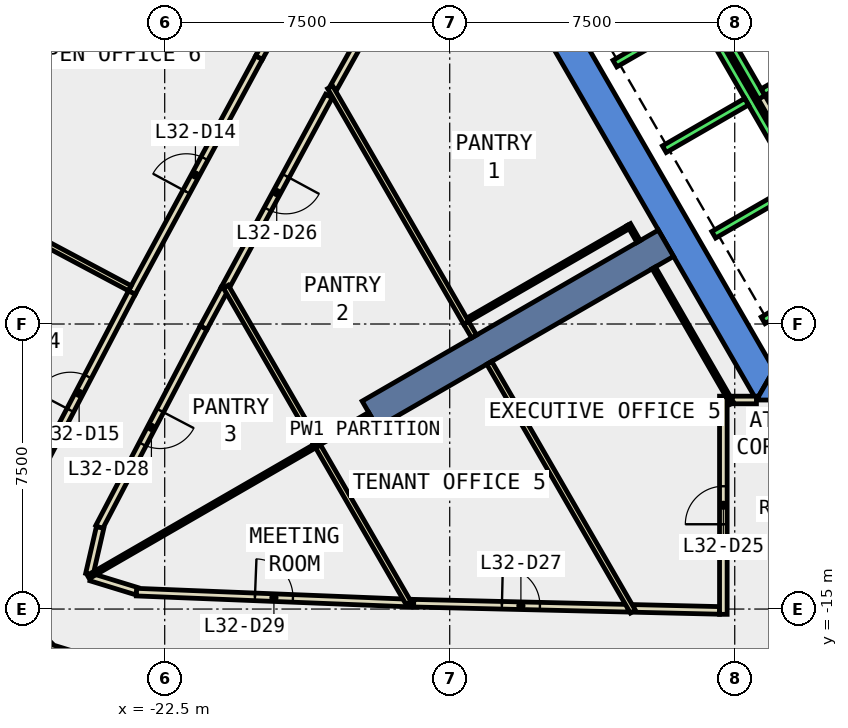
"""IFC4 building model, lengths in metres.
Left out: names, types, materials, properties, quantities, classifications, styles, units other than length and angle.
Written with IfcOpenShell. Run it as: python <this file> out.ifc"""

import sys

from ifc_helpers import new_model, si_unit, direction, frame, frame_2d, origin, place, context, subcontext, project, spatial, polyline, rectangle, outline, extrude, element, fill, save


model = new_model("IFC4")
c1 = context("Model", 3, precision=1e-05, world=origin(), true_north=direction((0.0, 1.0)))
c2 = subcontext(c1, "Body", "Model", "MODEL_VIEW")
j1 = project(units=[si_unit("LENGTHUNIT", "METRE"), si_unit("PLANEANGLEUNIT", "RADIAN")], contexts=[c1])
p1 = place(None, origin())
s1 = spatial("IfcSite", under=j1, at=p1, CompositionType="ELEMENT")
p2 = place(p1, origin())
s2 = spatial("IfcBuilding", under=s1, at=p2, CompositionType="ELEMENT")
p3 = place(p2, frame((0.0, 0.0, 146.6)))
s3 = spatial("IfcBuildingStorey", under=s2, at=p3, CompositionType="ELEMENT", Elevation=146.6)
p4 = place(p3, frame((0.0, 0.0, -0.4)))
e1 = element("IfcWall", 1, at=p4, inside=s3, PredefinedType="SHEAR", context=c2, shape_type="SweptSolid", body=[
    extrude(outline(polyline([(-13.856, 2.5), (-6.928, -9.5), (-6.466, -8.7), (-12.933, 2.5), (-13.856, 2.5)])), origin(), (0.0, 0.0, 1.0), 4.2),
])
p5 = place(p3, frame((0.0, 0.0, -0.4)))
e2 = element("IfcWall", 2, at=p5, inside=s3, PredefinedType="SHEAR", context=c2, shape_type="SweptSolid", body=[
    extrude(outline(polyline([(3.75, -9.5), (3.75, -8.7), (-6.466, -8.7), (-6.928, -9.5), (3.75, -9.5)])), origin(), (0.0, 0.0, 1.0), 4.2),
])
p6 = place(p3, frame((-9.31, -5.375, -0.4), z_axis=(0.0, 0.0, 1.0), x_axis=(-0.866017533419, -0.500013631625, 0.0)))
e3 = element("IfcWall", 3, at=p6, inside=s3, PredefinedType="SHEAR", context=c2, shape_type="SweptSolid", body=[
    extrude(rectangle(XDim=9.0, YDim=0.8, at=frame_2d((4.5, 0.0))), origin(), (0.0, 0.0, 1.0), 4.2),
])
p7 = place(p3, frame((-14.955, 4.264, 0.0), z_axis=(0.0, 0.0, 1.0), x_axis=(-0.4879770011, -0.872856486713, 0.0)))
e4 = element("IfcWall", 4, at=p7, inside=s3, PredefinedType="PARTITIONING", context=c2, shape_type="SweptSolid", body=[
    extrude(rectangle(XDim=6.363, YDim=0.2, at=frame_2d((3.182, 0.0))), origin(), (0.0, 0.0, 1.0), 3.8),
])
p8 = place(p7, frame((2.681, 0.0, 0.0)))
e5 = element("IfcOpeningElement", 5, at=p8, cuts=e4, PredefinedType="OPENING", context=c2, shape_type="SweptSolid", body=[
    extrude(rectangle(XDim=1.0, YDim=2.1, at=frame_2d((0.5, 1.05))), frame((0.0, 0.11, 0.0), z_axis=(0.0, -1.0, 0.0), x_axis=(1.0, 0.0, 0.0)), (0.0, 0.0, 1.0), 0.22),
])
p9 = place(p3, frame((-10.155, -14.983, 0.0), z_axis=(0.0, 0.0, 1.0), x_axis=(0.999724165956, -0.023485995887, 0.0)))
e6 = element("IfcWall", 6, at=p9, inside=s3, PredefinedType="PARTITIONING", context=c2, shape_type="SweptSolid", body=[
    extrude(rectangle(XDim=2.256, YDim=0.2, at=frame_2d((1.128, 0.0))), origin(), (0.0, 0.0, 1.0), 3.8),
])
p10 = place(p3, frame((-18.178, -1.501, 0.0), z_axis=(0.0, 0.0, 1.0), x_axis=(-0.475923642768, -0.879486603795, 0.0)))
e7 = element("IfcWall", 7, at=p10, inside=s3, PredefinedType="PARTITIONING", context=c2, shape_type="SweptSolid", body=[
    extrude(rectangle(XDim=5.776, YDim=0.2, at=frame_2d((2.888, 0.0))), origin(), (0.0, 0.0, 1.0), 3.8),
])
p11 = place(p10, frame((2.388, 0.0, 0.0)))
e8 = element("IfcOpeningElement", 8, at=p11, cuts=e7, PredefinedType="OPENING", context=c2, shape_type="SweptSolid", body=[
    extrude(rectangle(XDim=1.0, YDim=2.1, at=frame_2d((0.5, 1.05))), frame((0.0, 0.11, 0.0), z_axis=(0.0, -1.0, 0.0), x_axis=(1.0, 0.0, 0.0)), (0.0, 0.0, 1.0), 0.22),
])
p12 = place(p3, frame((-15.948, -14.846, 0.0), z_axis=(0.0, 0.0, 1.0), x_axis=(0.999722136341, -0.023572231734, 0.0)))
e9 = element("IfcWall", 9, at=p12, inside=s3, PredefinedType="PARTITIONING", context=c2, shape_type="SweptSolid", body=[
    extrude(rectangle(XDim=5.645, YDim=0.2, at=frame_2d((2.822, 0.0))), origin(), (0.0, 0.0, 1.0), 3.8),
])
p13 = place(p12, frame((2.322, 0.0, 0.0)))
e10 = element("IfcOpeningElement", 10, at=p13, cuts=e9, PredefinedType="OPENING", context=c2, shape_type="SweptSolid", body=[
    extrude(rectangle(XDim=1.0, YDim=2.1, at=frame_2d((0.5, 1.05))), frame((0.0, 0.11, 0.0), z_axis=(0.0, -1.0, 0.0), x_axis=(1.0, 0.0, 0.0)), (0.0, 0.0, 1.0), 0.22),
])
p14 = place(p3, frame((-21.475, -7.594, 0.0), z_axis=(0.0, 0.0, 1.0), x_axis=(-0.463809970306, -0.885934710599, 0.0)))
e11 = element("IfcWall", 11, at=p14, inside=s3, PredefinedType="PARTITIONING", context=c2, shape_type="SweptSolid", body=[
    extrude(rectangle(XDim=5.927, YDim=0.2, at=frame_2d((2.963, 0.0))), origin(), (0.0, 0.0, 1.0), 3.8),
])
p15 = place(p14, frame((2.464, 0.0, 0.0)))
e12 = element("IfcOpeningElement", 12, at=p15, cuts=e11, PredefinedType="OPENING", context=c2, shape_type="SweptSolid", body=[
    extrude(rectangle(XDim=1.0, YDim=2.1, at=frame_2d((0.5, 1.05))), frame((0.0, 0.11, 0.0), z_axis=(0.0, -1.0, 0.0), x_axis=(1.0, 0.0, 0.0)), (0.0, 0.0, 1.0), 0.22),
])
p16 = place(p3, frame((-24.2, -12.854, 0.0), z_axis=(0.0, 0.0, 1.0), x_axis=(-0.223967203961, -0.974596681479, 0.0)))
e13 = element("IfcWall", 13, at=p16, inside=s3, PredefinedType="PARTITIONING", context=c2, shape_type="SweptSolid", body=[
    extrude(rectangle(XDim=1.259, YDim=0.2, at=frame_2d((0.629, 0.0))), origin(), (0.0, 0.0, 1.0), 3.8),
])
p17 = place(p3, frame((-20.927, -6.581, 0.0), z_axis=(0.0, 0.0, 1.0), x_axis=(-0.475893856394, -0.879502721682, 0.0)))
e14 = element("IfcWall", 14, at=p17, inside=s3, PredefinedType="PARTITIONING", context=c2, shape_type="SweptSolid", body=[
    extrude(rectangle(XDim=1.152, YDim=0.2, at=frame_2d((0.576, 0.0))), origin(), (0.0, 0.0, 1.0), 3.8),
])
p18 = place(p3, frame((-24.435, -14.162, 0.0), z_axis=(0.0, 0.0, 1.0), x_axis=(0.956086269468, -0.293085389152, 0.0)))
e15 = element("IfcWall", 15, at=p18, inside=s3, PredefinedType="PARTITIONING", context=c2, shape_type="SweptSolid", body=[
    extrude(rectangle(XDim=1.252, YDim=0.2, at=frame_2d((0.626, 0.0))), origin(), (0.0, 0.0, 1.0), 3.8),
])
p19 = place(p3, frame((-23.242, -14.555, 0.0), z_axis=(0.0, 0.0, 1.0), x_axis=(0.999202143743, -0.039938401802, 0.0)))
e16 = element("IfcWall", 16, at=p19, inside=s3, PredefinedType="PARTITIONING", context=c2, shape_type="SweptSolid", body=[
    extrude(rectangle(XDim=7.238, YDim=0.2, at=frame_2d((3.619, 0.0))), origin(), (0.0, 0.0, 1.0), 3.8),
])
p20 = place(p19, frame((3.119, 0.0, 0.0)))
e17 = element("IfcOpeningElement", 17, at=p20, cuts=e16, PredefinedType="OPENING", context=c2, shape_type="SweptSolid", body=[
    extrude(rectangle(XDim=1.0, YDim=2.1, at=frame_2d((0.5, 1.05))), frame((0.0, 0.11, 0.0), z_axis=(0.0, -1.0, 0.0), x_axis=(1.0, 0.0, 0.0)), (0.0, 0.0, 1.0), 0.22),
])
p21 = place(p3, frame((-23.365, -6.673, 0.0), z_axis=(0.0, 0.0, 1.0), x_axis=(0.47597665142, 0.879457916732, 0.0)))
e18 = element("IfcWall", 18, at=p21, inside=s3, PredefinedType="PARTITIONING", context=c2, shape_type="SweptSolid", body=[
    extrude(rectangle(XDim=7.032, YDim=0.2, at=frame_2d((3.516, 0.0))), origin(), (0.0, 0.0, 1.0), 3.8),
])
p22 = place(p21, frame((3.016, 0.0, 0.0)))
e19 = element("IfcOpeningElement", 19, at=p22, cuts=e18, PredefinedType="OPENING", context=c2, shape_type="SweptSolid", body=[
    extrude(rectangle(XDim=1.0, YDim=2.1, at=frame_2d((0.5, 1.05))), frame((0.0, 0.11, 0.0), z_axis=(0.0, -1.0, 0.0), x_axis=(1.0, 0.0, 0.0)), (0.0, 0.0, 1.0), 0.22),
])
p23 = place(p3, frame((-20.018, -0.489, 0.0), z_axis=(0.0, 0.0, 1.0), x_axis=(0.48792588674, 0.872885060617, 0.0)))
e20 = element("IfcWall", 20, at=p23, inside=s3, PredefinedType="PARTITIONING", context=c2, shape_type="SweptSolid", body=[
    extrude(rectangle(XDim=3.403, YDim=0.2, at=frame_2d((1.701, 0.0))), origin(), (0.0, 0.0, 1.0), 3.8),
])
p24 = place(p3, frame((-26.21, -12.111, 0.0), z_axis=(0.0, 0.0, 1.0), x_axis=(0.46374980173, 0.885966207818, 0.0)))
e21 = element("IfcWall", 21, at=p24, inside=s3, PredefinedType="PARTITIONING", context=c2, shape_type="SweptSolid", body=[
    extrude(rectangle(XDim=6.137, YDim=0.2, at=frame_2d((3.068, 0.0))), origin(), (0.0, 0.0, 1.0), 3.8),
])
p25 = place(p24, frame((2.644, 0.0, 0.0)))
e22 = element("IfcOpeningElement", 22, at=p25, cuts=e21, PredefinedType="OPENING", context=c2, shape_type="SweptSolid", body=[
    extrude(rectangle(XDim=1.0, YDim=2.1, at=frame_2d((0.5, 1.05))), frame((0.0, 0.11, 0.0), z_axis=(0.0, -1.0, 0.0), x_axis=(1.0, 0.0, 0.0)), (0.0, 0.0, 1.0), 0.22),
])
p26 = place(p3, frame((-23.594, -16.617, 0.0), z_axis=(0.0, 0.0, 1.0), x_axis=(-0.955896815358, 0.293702704087, 0.0)))
e23 = element("IfcWall", 23, at=p26, inside=s3, PredefinedType="PARTITIONING", context=c2, shape_type="SweptSolid", body=[
    extrude(rectangle(XDim=2.06, YDim=0.2, at=frame_2d((1.03, 0.0))), origin(), (0.0, 0.0, 1.0), 3.8),
])
p27 = place(p3, frame((-5.492, -3.788, 0.0), z_axis=(0.0, 0.0, 1.0), x_axis=(-0.500008949224, 0.866020236886, 0.0)))
e24 = element("IfcWall", 24, at=p27, inside=s3, PredefinedType="PARTITIONING", context=c2, shape_type="SweptSolid", body=[
    extrude(rectangle(XDim=2.68, YDim=0.2, at=frame_2d((1.34, 0.0))), origin(), (0.0, 0.0, 1.0), 3.8),
])
p28 = place(p3, frame((-7.572, -9.499, 0.0), z_axis=(0.0, 0.0, 1.0), x_axis=(1.0, 0.0, 0.0)))
e25 = element("IfcWall", 25, at=p28, inside=s3, PredefinedType="PARTITIONING", context=c2, shape_type="SweptSolid", body=[
    extrude(rectangle(XDim=0.643, YDim=0.2, at=frame_2d((0.322, 0.0))), origin(), (0.0, 0.0, 1.0), 3.8),
])
p29 = place(p3, frame((-7.8, -15.139, 0.0), z_axis=(0.0, 0.0, 1.0), x_axis=(0.0, 1.0, 0.0)))
e26 = element("IfcWall", 26, at=p29, inside=s3, PredefinedType="PARTITIONING", context=c2, shape_type="SweptSolid", body=[
    extrude(rectangle(XDim=5.74, YDim=0.2, at=frame_2d((2.87, 0.0))), origin(), (0.0, 0.0, 1.0), 3.8),
])
p30 = place(p29, frame((2.37, 0.0, 0.0)))
e27 = element("IfcOpeningElement", 27, at=p30, cuts=e26, PredefinedType="OPENING", context=c2, shape_type="SweptSolid", body=[
    extrude(rectangle(XDim=1.0, YDim=2.1, at=frame_2d((0.5, 1.05))), frame((0.0, 0.11, 0.0), z_axis=(0.0, -1.0, 0.0), x_axis=(1.0, 0.0, 0.0)), (0.0, 0.0, 1.0), 0.22),
])
p31 = place(p3, frame((-7.572, -9.586, 0.0), z_axis=(0.0, 0.0, 1.0), x_axis=(-0.500037407586, 0.866003805427, 0.0)))
e28 = element("IfcWall", 28, at=p31, inside=s3, PredefinedType="PARTITIONING", context=c2, shape_type="SweptSolid", body=[
    extrude(rectangle(XDim=4.115, YDim=0.1, at=frame_2d((2.058, 0.0))), origin(), (0.0, 0.0, 1.0), 3.8),
])
p32 = place(p3, frame((-10.305, -4.951, 0.0), z_axis=(0.0, 0.0, 1.0), x_axis=(-0.866031185235, -0.4999899861, 0.0)))
e29 = element("IfcWall", 29, at=p32, inside=s3, PredefinedType="PARTITIONING", context=c2, shape_type="SweptSolid", body=[
    extrude(rectangle(XDim=4.95, YDim=0.1, at=frame_2d((2.475, 0.0))), origin(), (0.0, 0.0, 1.0), 3.8),
])
p33 = place(p3, frame((-14.567, -7.469, 0.0), z_axis=(0.0, 0.0, 1.0), x_axis=(-0.500056007527, 0.865993065409, 0.0)))
e30 = element("IfcWall", 30, at=p33, inside=s3, PredefinedType="PARTITIONING", context=c2, shape_type="SweptSolid", body=[
    extrude(rectangle(XDim=7.159, YDim=0.15, at=frame_2d((3.58, 0.0))), origin(), (0.0, 0.0, 1.0), 3.8),
])
p34 = place(p3, frame((-14.359, -7.828, 0.0), z_axis=(0.0, 0.0, 1.0), x_axis=(-0.501453821755, 0.865184410775, 0.0)))
e31 = element("IfcWall", 31, at=p34, inside=s3, PredefinedType="PARTITIONING", context=c2, shape_type="SweptSolid", body=[
    extrude(rectangle(XDim=0.415, YDim=0.15, at=frame_2d((0.208, 0.0))), origin(), (0.0, 0.0, 1.0), 3.8),
])
p35 = place(p3, frame((-10.18, -15.068, 0.0), z_axis=(0.0, 0.0, 1.0), x_axis=(-0.499907901386, 0.866078570415, 0.0)))
e32 = element("IfcWall", 32, at=p35, inside=s3, PredefinedType="PARTITIONING", context=c2, shape_type="SweptSolid", body=[
    extrude(rectangle(XDim=7.56, YDim=0.15, at=frame_2d((3.78, 0.0))), origin(), (0.0, 0.0, 1.0), 3.8),
])
p36 = place(p3, frame((-17.108, -9.869, 0.0), z_axis=(0.0, 0.0, 1.0), x_axis=(-0.866054481515, -0.499949632511, 0.0)))
e33 = element("IfcWall", 33, at=p36, inside=s3, PredefinedType="PARTITIONING", context=c2, shape_type="SweptSolid", body=[
    extrude(rectangle(XDim=1.675, YDim=0.1, at=frame_2d((0.837, 0.0))), origin(), (0.0, 0.0, 1.0), 3.8),
])
p37 = place(p3, frame((-18.518, -10.625, 0.0), z_axis=(0.0, 0.0, 1.0), x_axis=(-0.50001189137, 0.86601853819, 0.0)))
e34 = element("IfcWall", 34, at=p37, inside=s3, PredefinedType="PARTITIONING", context=c2, shape_type="SweptSolid", body=[
    extrude(rectangle(XDim=4.746, YDim=0.15, at=frame_2d((2.373, 0.0))), origin(), (0.0, 0.0, 1.0), 3.8),
])
p38 = place(p3, frame((-16.084, -14.841, 0.0), z_axis=(0.0, 0.0, 1.0), x_axis=(-0.50002451059, 0.866011252126, 0.0)))
e35 = element("IfcWall", 35, at=p38, inside=s3, PredefinedType="PARTITIONING", context=c2, shape_type="SweptSolid", body=[
    extrude(rectangle(XDim=4.758, YDim=0.15, at=frame_2d((2.379, 0.0))), origin(), (0.0, 0.0, 1.0), 3.8),
])
p39 = place(p3, frame((-18.553, -10.715, 0.0), z_axis=(0.0, 0.0, 1.0), x_axis=(-0.865984622623, -0.500070628392, 0.0)))
e36 = element("IfcWall", 36, at=p39, inside=s3, PredefinedType="PARTITIONING", context=c2, shape_type="SweptSolid", body=[
    extrude(rectangle(XDim=6.879, YDim=0.1, at=frame_2d((3.439, 0.0))), origin(), (0.0, 0.0, 1.0), 3.8),
])
p40 = place(p3, frame((-23.417, -6.56, 0.0), z_axis=(0.0, 0.0, 1.0), x_axis=(-0.882784638588, 0.469777906967, 0.0)))
e37 = element("IfcWall", 37, at=p40, inside=s3, PredefinedType="PARTITIONING", context=c2, shape_type="SweptSolid", body=[
    extrude(rectangle(XDim=5.13, YDim=0.15, at=frame_2d((2.565, 0.0))), origin(), (0.0, 0.0, 1.0), 3.8),
])
p41 = place(p3, frame((-10.03, -5.329, 0.0), z_axis=(0.0, 0.0, 1.0), x_axis=(-0.499352927503, 0.866398669086, 0.0)))
e38 = element("IfcWall", 38, at=p41, inside=s3, PredefinedType="PARTITIONING", context=c2, shape_type="SweptSolid", body=[
    extrude(rectangle(XDim=0.515, YDim=0.1, at=frame_2d((0.257, 0.0))), origin(), (0.0, 0.0, 1.0), 3.8),
])
p42 = place(p3, frame((-8.192, 0.888, 0.0), z_axis=(0.0, 0.0, 1.0), x_axis=(0.49994636267, -0.866056369097, 0.0)))
e39 = element("IfcWall", 39, at=p42, inside=s3, PredefinedType="STANDARD", context=c2, shape_type="SweptSolid", body=[
    extrude(rectangle(XDim=2.8, YDim=0.2, at=frame_2d((1.4, 0.0))), origin(), (0.0, 0.0, 1.0), 3.8),
])
p43 = place(p3, frame((-4.677, -0.2, 0.0), z_axis=(0.0, 0.0, 1.0), x_axis=(-0.865973769406, -0.500089422704, 0.0)))
e40 = element("IfcWall", 40, at=p43, inside=s3, PredefinedType="STANDARD", context=c2, shape_type="SweptSolid", body=[
    extrude(rectangle(XDim=2.399, YDim=0.2, at=frame_2d((1.2, 0.0))), origin(), (0.0, 0.0, 1.0), 3.8),
])
p44 = place(p3, frame((-9.751, 2.99, 0.0), z_axis=(0.0, 0.0, 1.0), x_axis=(0.50000090737, -0.866024879913, 0.0)))
e41 = element("IfcWall", 41, at=p44, inside=s3, PredefinedType="STANDARD", context=c2, shape_type="SweptSolid", body=[
    extrude(rectangle(XDim=10.6, YDim=0.2, at=frame_2d((5.3, 0.0))), origin(), (0.0, 0.0, 1.0), 3.8),
])
for number, where, z_axis, x_axis in (
    (42, (-8.488, 0.602, 0.0), (0.0, 0.0, 1.0), (-0.866, -0.5, 0.0)),
    (43, (-7.188, -1.65, 0.0), (0.0, 0.0, 1.0), (-0.866, -0.5, 0.0)),
    (44, (-5.888, -3.902, 0.0), (0.0, 0.0, 1.0), (-0.866, -0.5, 0.0)),
    (45, (-4.588, -6.153, 0.0), (0.0, 0.0, 1.0), (-0.866, -0.5, 0.0)),
):
    element("IfcWall", number, at=place(p3, frame(where, z_axis=z_axis, x_axis=x_axis)), inside=s3, PredefinedType="STANDARD", context=c2, shape_type="SweptSolid", body=[
        extrude(rectangle(XDim=2.5, YDim=0.2, at=frame_2d((1.25, 0.0))), origin(), (0.0, 0.0, 1.0), 3.8),
    ])
p45 = place(p22, origin())
e46 = element("IfcDoor", 46, at=p45, inside=s3, OperationType="SINGLE_SWING_LEFT", PredefinedType="DOOR", context=c2, shape_type="SweptSolid", body=[
    extrude(rectangle(XDim=1.0, YDim=2.1, at=frame_2d((0.5, 1.05))), frame((0.0, 0.025, 0.0), z_axis=(0.0, -1.0, 0.0), x_axis=(1.0, 0.0, 0.0)), (0.0, 0.0, 1.0), 0.05),
])
fill(e19, e46)
p46 = place(p25, origin())
e47 = element("IfcDoor", 47, at=p46, inside=s3, OperationType="SINGLE_SWING_LEFT", PredefinedType="DOOR", context=c2, shape_type="SweptSolid", body=[
    extrude(rectangle(XDim=1.0, YDim=2.1, at=frame_2d((0.5, 1.05))), frame((0.0, 0.025, 0.0), z_axis=(0.0, -1.0, 0.0), x_axis=(1.0, 0.0, 0.0)), (0.0, 0.0, 1.0), 0.05),
])
fill(e22, e47)
p47 = place(p30, origin())
e48 = element("IfcDoor", 48, at=p47, inside=s3, OperationType="SINGLE_SWING_LEFT", PredefinedType="DOOR", context=c2, shape_type="SweptSolid", body=[
    extrude(rectangle(XDim=1.0, YDim=2.1, at=frame_2d((0.5, 1.05))), frame((0.0, 0.025, 0.0), z_axis=(0.0, -1.0, 0.0), x_axis=(1.0, 0.0, 0.0)), (0.0, 0.0, 1.0), 0.05),
])
fill(e27, e48)
p48 = place(p11, origin())
e49 = element("IfcDoor", 49, at=p48, inside=s3, OperationType="SINGLE_SWING_LEFT", PredefinedType="DOOR", context=c2, shape_type="SweptSolid", body=[
    extrude(rectangle(XDim=1.0, YDim=2.1, at=frame_2d((0.5, 1.05))), frame((0.0, 0.025, 0.0), z_axis=(0.0, -1.0, 0.0), x_axis=(1.0, 0.0, 0.0)), (0.0, 0.0, 1.0), 0.05),
])
fill(e8, e49)
p49 = place(p13, origin())
e50 = element("IfcDoor", 50, at=p49, inside=s3, OperationType="SINGLE_SWING_LEFT", PredefinedType="DOOR", context=c2, shape_type="SweptSolid", body=[
    extrude(rectangle(XDim=1.0, YDim=2.1, at=frame_2d((0.5, 1.05))), frame((0.0, 0.025, 0.0), z_axis=(0.0, -1.0, 0.0), x_axis=(1.0, 0.0, 0.0)), (0.0, 0.0, 1.0), 0.05),
])
fill(e10, e50)
p50 = place(p15, origin())
e51 = element("IfcDoor", 51, at=p50, inside=s3, OperationType="SINGLE_SWING_LEFT", PredefinedType="DOOR", context=c2, shape_type="SweptSolid", body=[
    extrude(rectangle(XDim=1.0, YDim=2.1, at=frame_2d((0.5, 1.05))), frame((0.0, 0.025, 0.0), z_axis=(0.0, -1.0, 0.0), x_axis=(1.0, 0.0, 0.0)), (0.0, 0.0, 1.0), 0.05),
])
fill(e12, e51)
p51 = place(p20, origin())
e52 = element("IfcDoor", 52, at=p51, inside=s3, OperationType="SINGLE_SWING_LEFT", PredefinedType="DOOR", context=c2, shape_type="SweptSolid", body=[
    extrude(rectangle(XDim=1.0, YDim=2.1, at=frame_2d((0.5, 1.05))), frame((0.0, 0.025, 0.0), z_axis=(0.0, -1.0, 0.0), x_axis=(1.0, 0.0, 0.0)), (0.0, 0.0, 1.0), 0.05),
])
fill(e17, e52)
save(model, sys.argv[1])
